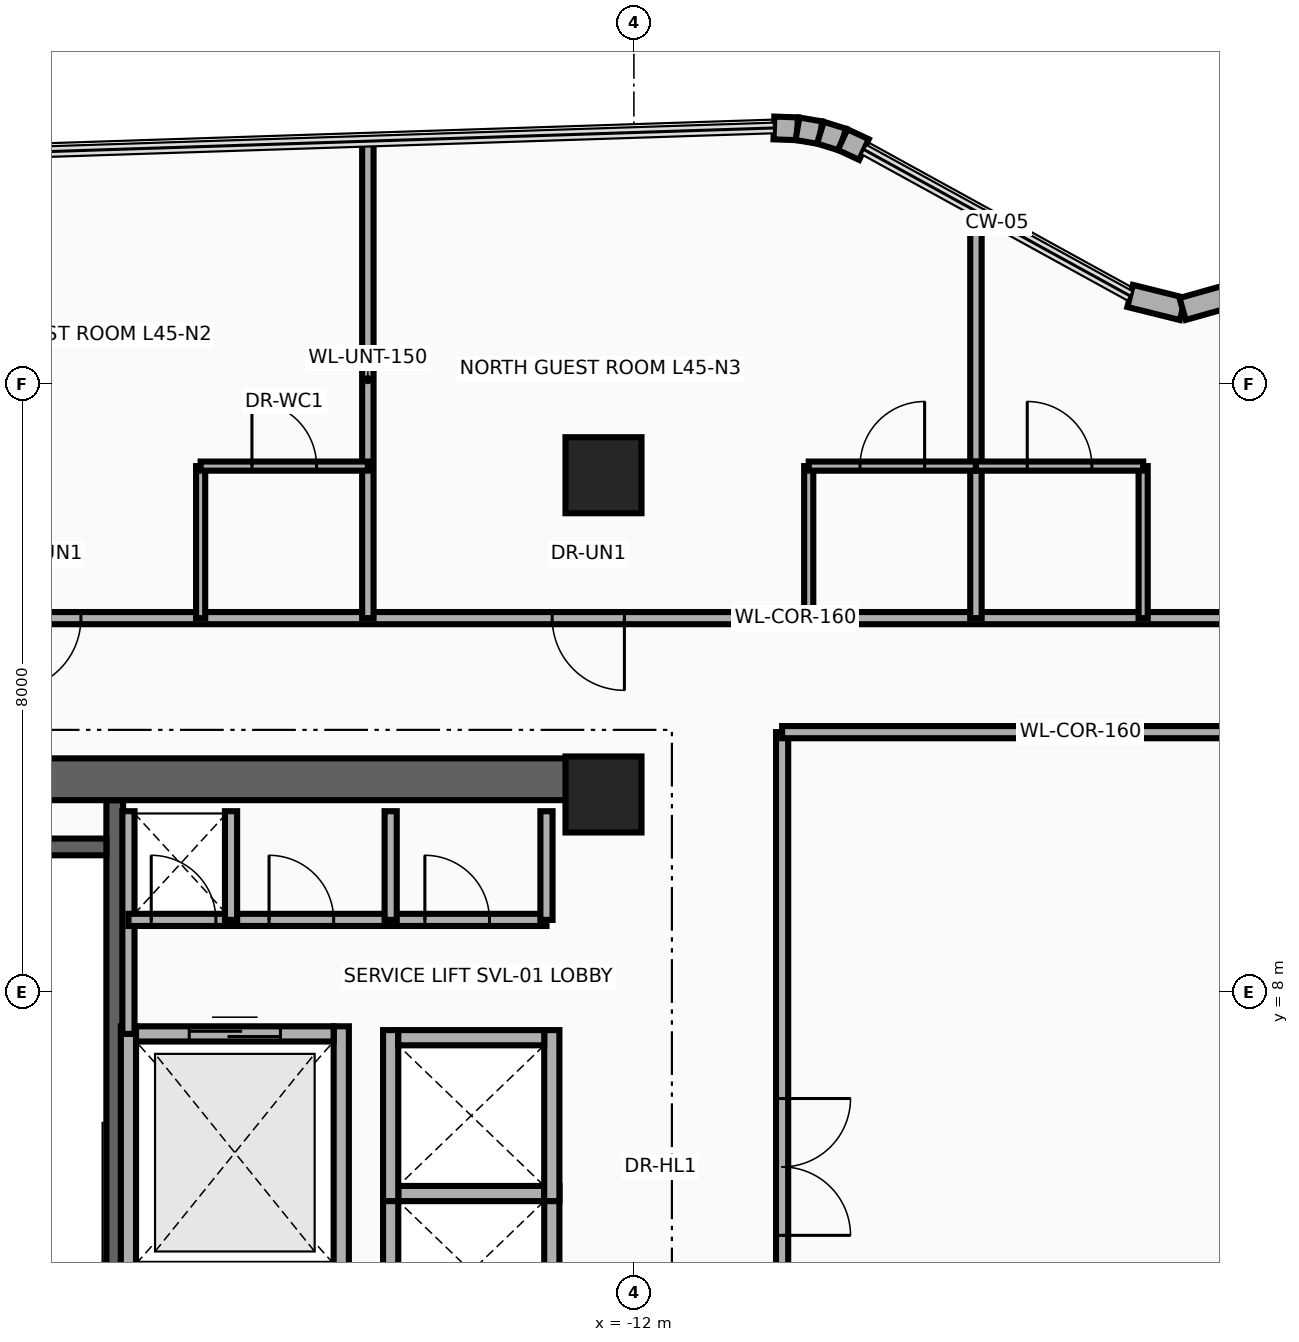
"""IFC4 building model, lengths in metres.
Left out: names, types, materials, properties, quantities, classifications, styles, units other than length and angle.
Written with IfcOpenShell. Run it as: python <this file> out.ifc"""

import sys

from ifc_helpers import new_model, si_unit, direction, frame, frame_2d, origin, origin_2d, place, context, subcontext, project, spatial, rectangle, extrude, source, transform, mapped, element, fill, save


model = new_model("IFC4")
c1 = context("Model", 3, precision=1e-05, world=origin(), true_north=direction((0.0, 1.0)))
c2 = subcontext(c1, "Body", "Model", "MODEL_VIEW")
j1 = project(units=[si_unit("LENGTHUNIT", "METRE"), si_unit("PLANEANGLEUNIT", "RADIAN")], contexts=[c1])
p1 = place(None, origin())
s1 = spatial("IfcSite", under=j1, at=p1, CompositionType="ELEMENT")
p2 = place(p1, origin())
s2 = spatial("IfcBuilding", under=s1, at=p2, CompositionType="ELEMENT")
p3 = place(p2, frame((0.0, 0.0, 176.55)))
s3 = spatial("IfcBuildingStorey", under=s2, at=p3, CompositionType="ELEMENT", Elevation=176.55)
p4 = place(p3, frame((-18.83, 1.78, 0.0), z_axis=(0.0, 0.0, 1.0), x_axis=(0.0, 1.0, 0.0)))
e1 = element("IfcWall", 1, at=p4, inside=s3, PredefinedType="SHEAR", context=c2, shape_type="SweptSolid", body=[
    extrude(rectangle(XDim=8.745, YDim=0.22, at=frame_2d((4.373, 0.0))), origin(), (0.0, 0.0, 1.0), 3.63),
])
p5 = place(p3, frame((-22.05, 9.91, 0.0), z_axis=(0.0, 0.0, 1.0), x_axis=(1.0, 0.0, 0.0)))
e2 = element("IfcWall", 2, at=p5, inside=s3, PredefinedType="SHEAR", context=c2, shape_type="SweptSolid", body=[
    extrude(rectangle(XDim=3.11, YDim=0.22, at=frame_2d((1.555, 0.0))), origin(), (0.0, 0.0, 1.0), 3.63),
])
p6 = place(p3, frame((-22.65, 10.8, 0.0), z_axis=(0.0, 0.0, 1.0), x_axis=(1.0, 0.0, 0.0)))
e3 = element("IfcWall", 3, at=p6, inside=s3, PredefinedType="SHEAR", context=c2, shape_type="SweptSolid", body=[
    extrude(rectangle(XDim=10.25, YDim=0.55, at=frame_2d((5.125, 0.0))), origin(), (0.0, 0.0, 1.0), 3.63),
])
m1 = source(origin(), c2, "Body", "SweptSolid", [
    extrude(rectangle(XDim=1.0, YDim=1.0, at=origin_2d()), origin(), (0.0, 0.0, 1.0), 3.95),
])
for number, where, z_axis, x_axis in (
    (4, (-12.4, 10.6, 0.0), (0.0, 0.0, 1.0), (1.0, 0.0, 0.0)),
    (5, (-12.4, 14.8, 0.0), (0.0, 0.0, 1.0), (1.0, 0.0, 0.0)),
):
    element("IfcColumn", number, at=place(p3, frame(where, z_axis=z_axis, x_axis=x_axis)), inside=s3, PredefinedType="COLUMN", context=c2, shape_type="MappedRepresentation", body=[
        mapped(m1, transform((0.0, 0.0, 0.0), x_axis=(1.0, 0.0, 0.0), y_axis=(0.0, 1.0, 0.0), z_axis=(0.0, 0.0, 1.0), scale=1.0)),
    ])
p7 = place(p3, frame((-10.158, 19.368, 0.0), z_axis=(0.0, 0.0, 1.0), x_axis=(0.999425494718, -0.03389218949, 0.0)))
e6 = element("IfcWall", 6, at=p7, inside=s3, PredefinedType="SOLIDWALL", context=c2, shape_type="SweptSolid", body=[
    extrude(rectangle(XDim=0.31, YDim=0.3, at=frame_2d((0.155, 0.0))), origin(), (0.0, 0.0, 1.0), 3.63),
])
for number, where, z_axis, x_axis in (
    (7, (-9.848, 19.358, 0.0), (0.0, 0.0, 1.0), (0.986, -0.167, 0.0)),
    (8, (-9.546, 19.307, 0.0), (0.0, 0.0, 1.0), (0.955, -0.297, 0.0)),
):
    element("IfcWall", number, at=place(p3, frame(where, z_axis=z_axis, x_axis=x_axis)), inside=s3, PredefinedType="SOLIDWALL", context=c2, shape_type="SweptSolid", body=[
        extrude(rectangle(XDim=0.306, YDim=0.3, at=frame_2d((0.153, 0.0))), origin(), (0.0, 0.0, 1.0), 3.63),
    ])
p8 = place(p3, frame((-9.254, 19.216, 0.0), z_axis=(0.0, 0.0, 1.0), x_axis=(0.906524902388, -0.42215234377, 0.0)))
e9 = element("IfcWall", 9, at=p8, inside=s3, PredefinedType="SOLIDWALL", context=c2, shape_type="SweptSolid", body=[
    extrude(rectangle(XDim=0.31, YDim=0.3, at=frame_2d((0.155, 0.0))), origin(), (0.0, 0.0, 1.0), 3.63),
])
p9 = place(p3, frame((-5.472, 17.159, 0.0), z_axis=(0.0, 0.0, 1.0), x_axis=(0.970564820059, -0.240840050789, 0.0)))
e10 = element("IfcWall", 10, at=p9, inside=s3, PredefinedType="SOLIDWALL", context=c2, shape_type="SweptSolid", body=[
    extrude(rectangle(XDim=0.712, YDim=0.3, at=frame_2d((0.356, 0.0))), origin(), (0.0, 0.0, 1.0), 3.63),
])
p10 = place(p3, frame((-4.781, 16.987, 0.0), z_axis=(0.0, 0.0, 1.0), x_axis=(0.962494705656, 0.271300463662, 0.0)))
e11 = element("IfcWall", 11, at=p10, inside=s3, PredefinedType="SOLIDWALL", context=c2, shape_type="SweptSolid", body=[
    extrude(rectangle(XDim=0.726, YDim=0.3, at=frame_2d((0.363, 0.0))), origin(), (0.0, 0.0, 1.0), 3.63),
])
for number, where, z_axis, x_axis in (
    (12, (-18.65, 4.225, 0.0), (0.0, 0.0, 1.0), (0.0, 1.0, 0.0)),
    (13, (-15.85, 4.225, 0.0), (0.0, 0.0, 1.0), (0.0, 1.0, 0.0)),
):
    element("IfcWall", number, at=place(p3, frame(where, z_axis=z_axis, x_axis=x_axis)), inside=s3, PredefinedType="MOVABLE", context=c2, shape_type="SweptSolid", body=[
        extrude(rectangle(XDim=3.325, YDim=0.2, at=frame_2d((1.663, 0.0))), origin(), (0.0, 0.0, 1.0), 3.63),
    ])
p11 = place(p3, frame((-18.55, 7.45, 0.0), z_axis=(0.0, 0.0, 1.0), x_axis=(1.0, 0.0, 0.0)))
e14 = element("IfcWall", 14, at=p11, inside=s3, PredefinedType="MOVABLE", context=c2, shape_type="SweptSolid", body=[
    extrude(rectangle(XDim=2.6, YDim=0.2, at=frame_2d((1.3, 0.0))), origin(), (0.0, 0.0, 1.0), 3.63),
])
p12 = place(p11, frame((0.7, 0.0, 0.0)))
e15 = element("IfcOpeningElement", 15, at=p12, cuts=e14, PredefinedType="OPENING", context=c2, shape_type="SweptSolid", body=[
    extrude(rectangle(XDim=1.2, YDim=2.1, at=frame_2d((0.6, 1.05))), frame((0.0, 0.115, 0.0), z_axis=(0.0, -1.0, 0.0), x_axis=(1.0, 0.0, 0.0)), (0.0, 0.0, 1.0), 0.23),
])
for number, where, z_axis, x_axis in (
    (16, (-15.2, 3.2, 0.0), (0.0, 0.0, 1.0), (0.0, 1.0, 0.0)),
    (17, (-13.08, 3.2, 0.0), (0.0, 0.0, 1.0), (0.0, 1.0, 0.0)),
):
    element("IfcWall", number, at=place(p3, frame(where, z_axis=z_axis, x_axis=x_axis)), inside=s3, PredefinedType="MOVABLE", context=c2, shape_type="SweptSolid", body=[
        extrude(rectangle(XDim=2.25, YDim=0.2, at=frame_2d((1.125, 0.0))), origin(), (0.0, 0.0, 1.0), 3.63),
    ])
p13 = place(p3, frame((-15.1, 5.35, 0.0), z_axis=(0.0, 0.0, 1.0), x_axis=(1.0, 0.0, 0.0)))
e18 = element("IfcWall", 18, at=p13, inside=s3, PredefinedType="MOVABLE", context=c2, shape_type="SweptSolid", body=[
    extrude(rectangle(XDim=1.92, YDim=0.2, at=frame_2d((0.96, 0.0))), origin(), (0.0, 0.0, 1.0), 3.63),
])
for number, where, z_axis, x_axis in (
    (19, (-15.2, 5.25, 0.0), (0.0, 0.0, 1.0), (0.0, 1.0, 0.0)),
    (20, (-13.08, 5.25, 0.0), (0.0, 0.0, 1.0), (0.0, 1.0, 0.0)),
):
    element("IfcWall", number, at=place(p3, frame(where, z_axis=z_axis, x_axis=x_axis)), inside=s3, PredefinedType="MOVABLE", context=c2, shape_type="SweptSolid", body=[
        extrude(rectangle(XDim=2.25, YDim=0.2, at=frame_2d((1.125, 0.0))), origin(), (0.0, 0.0, 1.0), 3.63),
    ])
p14 = place(p3, frame((-15.1, 7.4, 0.0), z_axis=(0.0, 0.0, 1.0), x_axis=(1.0, 0.0, 0.0)))
e21 = element("IfcWall", 21, at=p14, inside=s3, PredefinedType="MOVABLE", context=c2, shape_type="SweptSolid", body=[
    extrude(rectangle(XDim=1.92, YDim=0.2, at=frame_2d((0.96, 0.0))), origin(), (0.0, 0.0, 1.0), 3.63),
])
p15 = place(p3, frame((-18.65, 7.45, 0.0), z_axis=(0.0, 0.0, 1.0), x_axis=(0.0, 1.0, 0.0)))
e22 = element("IfcWall", 22, at=p15, inside=s3, PredefinedType="PARTITIONING", context=c2, shape_type="SweptSolid", body=[
    extrude(rectangle(XDim=2.93, YDim=0.16, at=frame_2d((1.465, 0.0))), origin(), (0.0, 0.0, 1.0), 3.63),
])
p16 = place(p3, frame((-18.65, 8.95, 0.0), z_axis=(0.0, 0.0, 1.0), x_axis=(1.0, 0.0, 0.0)))
e23 = element("IfcWall", 23, at=p16, inside=s3, PredefinedType="PARTITIONING", context=c2, shape_type="SweptSolid", body=[
    extrude(rectangle(XDim=5.5, YDim=0.16, at=frame_2d((2.75, 0.0))), origin(), (0.0, 0.0, 1.0), 3.63),
])
p17 = place(p16, frame((0.3, 0.0, 0.0)))
e24 = element("IfcOpeningElement", 24, at=p17, cuts=e23, PredefinedType="OPENING", context=c2, shape_type="SweptSolid", body=[
    extrude(rectangle(XDim=0.85, YDim=2.05, at=frame_2d((0.425, 1.025))), frame((0.0, 0.095, 0.0), z_axis=(0.0, -1.0, 0.0), x_axis=(1.0, 0.0, 0.0)), (0.0, 0.0, 1.0), 0.19),
])
p18 = place(p16, frame((1.85, 0.0, 0.0)))
e25 = element("IfcOpeningElement", 25, at=p18, cuts=e23, PredefinedType="OPENING", context=c2, shape_type="SweptSolid", body=[
    extrude(rectangle(XDim=0.85, YDim=2.05, at=frame_2d((0.425, 1.025))), frame((0.0, 0.095, 0.0), z_axis=(0.0, -1.0, 0.0), x_axis=(1.0, 0.0, 0.0)), (0.0, 0.0, 1.0), 0.19),
])
p19 = place(p16, frame((3.9, 0.0, 0.0)))
e26 = element("IfcOpeningElement", 26, at=p19, cuts=e23, PredefinedType="OPENING", context=c2, shape_type="SweptSolid", body=[
    extrude(rectangle(XDim=0.85, YDim=2.05, at=frame_2d((0.425, 1.025))), frame((0.0, 0.095, 0.0), z_axis=(0.0, -1.0, 0.0), x_axis=(1.0, 0.0, 0.0)), (0.0, 0.0, 1.0), 0.19),
])
for number, where, z_axis, x_axis in (
    (27, (-13.15, 8.95, 0.0), (0.0, 0.0, 1.0), (0.0, 1.0, 0.0)),
    (28, (-17.3, 8.95, 0.0), (0.0, 0.0, 1.0), (0.0, 1.0, 0.0)),
    (29, (-15.2, 8.95, 0.0), (0.0, 0.0, 1.0), (0.0, 1.0, 0.0)),
):
    element("IfcWall", number, at=place(p3, frame(where, z_axis=z_axis, x_axis=x_axis)), inside=s3, PredefinedType="PARTITIONING", context=c2, shape_type="SweptSolid", body=[
        extrude(rectangle(XDim=1.43, YDim=0.16, at=frame_2d((0.715, 0.0))), origin(), (0.0, 0.0, 1.0), 3.63),
    ])
p20 = place(p3, frame((-28.25, 12.92, 0.0), z_axis=(0.0, 0.0, 1.0), x_axis=(1.0, 0.0, 0.0)))
e30 = element("IfcWall", 30, at=p20, inside=s3, PredefinedType="PARTITIONING", context=c2, shape_type="SweptSolid", body=[
    extrude(rectangle(XDim=36.75, YDim=0.16, at=frame_2d((18.375, 0.0))), origin(), (0.0, 0.0, 1.0), 2.615),
])
p21 = place(p20, frame((2.75, 0.0, 0.0)))
e31 = element("IfcOpeningElement", 31, at=p21, cuts=e30, PredefinedType="OPENING", context=c2, shape_type="SweptSolid", body=[
    extrude(rectangle(XDim=0.95, YDim=2.15, at=frame_2d((0.475, 1.075))), frame((0.0, 0.095, 0.0), z_axis=(0.0, -1.0, 0.0), x_axis=(1.0, 0.0, 0.0)), (0.0, 0.0, 1.0), 0.19),
])
p22 = place(p20, frame((8.025, 0.0, 0.0)))
e32 = element("IfcOpeningElement", 32, at=p22, cuts=e30, PredefinedType="OPENING", context=c2, shape_type="SweptSolid", body=[
    extrude(rectangle(XDim=0.95, YDim=2.15, at=frame_2d((0.475, 1.075))), frame((0.0, 0.095, 0.0), z_axis=(0.0, -1.0, 0.0), x_axis=(1.0, 0.0, 0.0)), (0.0, 0.0, 1.0), 0.19),
])
p23 = place(p20, frame((15.175, 0.0, 0.0)))
e33 = element("IfcOpeningElement", 33, at=p23, cuts=e30, PredefinedType="OPENING", context=c2, shape_type="SweptSolid", body=[
    extrude(rectangle(XDim=0.95, YDim=2.15, at=frame_2d((0.475, 1.075))), frame((0.0, 0.095, 0.0), z_axis=(0.0, -1.0, 0.0), x_axis=(1.0, 0.0, 0.0)), (0.0, 0.0, 1.0), 0.19),
])
p24 = place(p20, frame((25.375, 0.0, 0.0)))
e34 = element("IfcOpeningElement", 34, at=p24, cuts=e30, PredefinedType="OPENING", context=c2, shape_type="SweptSolid", body=[
    extrude(rectangle(XDim=0.95, YDim=2.15, at=frame_2d((0.475, 1.075))), frame((0.0, 0.095, 0.0), z_axis=(0.0, -1.0, 0.0), x_axis=(1.0, 0.0, 0.0)), (0.0, 0.0, 1.0), 0.19),
])
p25 = place(p20, frame((32.275, 0.0, 0.0)))
e35 = element("IfcOpeningElement", 35, at=p25, cuts=e30, PredefinedType="OPENING", context=c2, shape_type="SweptSolid", body=[
    extrude(rectangle(XDim=0.95, YDim=2.15, at=frame_2d((0.475, 1.075))), frame((0.0, 0.095, 0.0), z_axis=(0.0, -1.0, 0.0), x_axis=(1.0, 0.0, 0.0)), (0.0, 0.0, 1.0), 0.19),
])
p26 = place(p3, frame((-15.5, 12.92, 0.0), z_axis=(0.0, 0.0, 1.0), x_axis=(0.0, 1.0, 0.0)))
e36 = element("IfcWall", 36, at=p26, inside=s3, PredefinedType="PARTITIONING", context=c2, shape_type="SweptSolid", body=[
    extrude(rectangle(XDim=6.275, YDim=0.15, at=frame_2d((3.137, 0.0))), origin(), (0.0, 0.0, 1.0), 2.665),
])
p27 = place(p3, frame((-7.5, 12.92, 0.0), z_axis=(0.0, 0.0, 1.0), x_axis=(0.0, 1.0, 0.0)))
e37 = element("IfcWall", 37, at=p27, inside=s3, PredefinedType="PARTITIONING", context=c2, shape_type="SweptSolid", body=[
    extrude(rectangle(XDim=5.354, YDim=0.15, at=frame_2d((2.677, 0.0))), origin(), (0.0, 0.0, 1.0), 2.415),
])
p28 = place(p3, frame((-17.7, 12.92, 0.0), z_axis=(0.0, 0.0, 1.0), x_axis=(0.0, 1.0, 0.0)))
e38 = element("IfcWall", 38, at=p28, inside=s3, PredefinedType="PARTITIONING", context=c2, shape_type="SweptSolid", body=[
    extrude(rectangle(XDim=2.0, YDim=0.12, at=frame_2d((1.0, 0.0))), origin(), (0.0, 0.0, 1.0), 2.665),
])
p29 = place(p3, frame((-17.7, 14.92, 0.0), z_axis=(0.0, 0.0, 1.0), x_axis=(1.0, 0.0, 0.0)))
e39 = element("IfcWall", 39, at=p29, inside=s3, PredefinedType="PARTITIONING", context=c2, shape_type="SweptSolid", body=[
    extrude(rectangle(XDim=2.2, YDim=0.12, at=frame_2d((1.1, 0.0))), origin(), (0.0, 0.0, 1.0), 2.665),
])
p30 = place(p29, frame((0.675, 0.0, 0.0)))
e40 = element("IfcOpeningElement", 40, at=p30, cuts=e39, PredefinedType="OPENING", context=c2, shape_type="SweptSolid", body=[
    extrude(rectangle(XDim=0.85, YDim=2.1, at=frame_2d((0.425, 1.05))), frame((0.0, 0.075, 0.0), z_axis=(0.0, -1.0, 0.0), x_axis=(1.0, 0.0, 0.0)), (0.0, 0.0, 1.0), 0.15),
])
p31 = place(p3, frame((-9.7, 12.92, 0.0), z_axis=(0.0, 0.0, 1.0), x_axis=(0.0, 1.0, 0.0)))
e41 = element("IfcWall", 41, at=p31, inside=s3, PredefinedType="PARTITIONING", context=c2, shape_type="SweptSolid", body=[
    extrude(rectangle(XDim=2.0, YDim=0.12, at=frame_2d((1.0, 0.0))), origin(), (0.0, 0.0, 1.0), 2.415),
])
p32 = place(p3, frame((-9.7, 14.92, 0.0), z_axis=(0.0, 0.0, 1.0), x_axis=(1.0, 0.0, 0.0)))
e42 = element("IfcWall", 42, at=p32, inside=s3, PredefinedType="PARTITIONING", context=c2, shape_type="SweptSolid", body=[
    extrude(rectangle(XDim=2.2, YDim=0.12, at=frame_2d((1.1, 0.0))), origin(), (0.0, 0.0, 1.0), 2.415),
])
p33 = place(p32, frame((0.675, 0.0, 0.0)))
e43 = element("IfcOpeningElement", 43, at=p33, cuts=e42, PredefinedType="OPENING", context=c2, shape_type="SweptSolid", body=[
    extrude(rectangle(XDim=0.85, YDim=2.1, at=frame_2d((0.425, 1.05))), frame((0.0, 0.075, 0.0), z_axis=(0.0, -1.0, 0.0), x_axis=(1.0, 0.0, 0.0)), (0.0, 0.0, 1.0), 0.15),
])
p34 = place(p3, frame((-5.3, 12.92, 0.0), z_axis=(0.0, 0.0, 1.0), x_axis=(0.0, 1.0, 0.0)))
e44 = element("IfcWall", 44, at=p34, inside=s3, PredefinedType="PARTITIONING", context=c2, shape_type="SweptSolid", body=[
    extrude(rectangle(XDim=2.0, YDim=0.12, at=frame_2d((1.0, 0.0))), origin(), (0.0, 0.0, 1.0), 2.415),
])
p35 = place(p3, frame((-7.5, 14.92, 0.0), z_axis=(0.0, 0.0, 1.0), x_axis=(1.0, 0.0, 0.0)))
e45 = element("IfcWall", 45, at=p35, inside=s3, PredefinedType="PARTITIONING", context=c2, shape_type="SweptSolid", body=[
    extrude(rectangle(XDim=2.2, YDim=0.12, at=frame_2d((1.1, 0.0))), origin(), (0.0, 0.0, 1.0), 2.415),
])
p36 = place(p35, frame((0.675, 0.0, 0.0)))
e46 = element("IfcOpeningElement", 46, at=p36, cuts=e45, PredefinedType="OPENING", context=c2, shape_type="SweptSolid", body=[
    extrude(rectangle(XDim=0.85, YDim=2.1, at=frame_2d((0.425, 1.05))), frame((0.0, 0.075, 0.0), z_axis=(0.0, -1.0, 0.0), x_axis=(1.0, 0.0, 0.0)), (0.0, 0.0, 1.0), 0.15),
])
p37 = place(p3, frame((-10.05, -7.2, 0.0), z_axis=(0.0, 0.0, 1.0), x_axis=(0.0, 1.0, 0.0)))
e47 = element("IfcWall", 47, at=p37, inside=s3, PredefinedType="PARTITIONING", context=c2, shape_type="SweptSolid", body=[
    extrude(rectangle(XDim=18.62, YDim=0.16, at=frame_2d((9.31, 0.0))), origin(), (0.0, 0.0, 1.0), 2.415),
])
p38 = place(p37, frame((12.0, 0.0, 0.0)))
e48 = element("IfcOpeningElement", 48, at=p38, cuts=e47, PredefinedType="OPENING", context=c2, shape_type="SweptSolid", body=[
    extrude(rectangle(XDim=1.8, YDim=2.15, at=frame_2d((0.9, 1.075))), frame((0.0, 0.095, 0.0), z_axis=(0.0, -1.0, 0.0), x_axis=(1.0, 0.0, 0.0)), (0.0, 0.0, 1.0), 0.19),
])
p39 = place(p3, frame((-10.05, 11.42, 0.0), z_axis=(0.0, 0.0, 1.0), x_axis=(1.0, 0.0, 0.0)))
e49 = element("IfcWall", 49, at=p39, inside=s3, PredefinedType="PARTITIONING", context=c2, shape_type="SweptSolid", body=[
    extrude(rectangle(XDim=7.85, YDim=0.16, at=frame_2d((3.925, 0.0))), origin(), (0.0, 0.0, 1.0), 2.615),
])
p40 = place(p12, origin())
e50 = element("IfcDoor", 50, at=p40, inside=s3, OperationType="DOUBLE_DOOR_SLIDING", PredefinedType="DOOR", context=c2, shape_type="SweptSolid", body=[
    extrude(rectangle(XDim=1.2, YDim=2.1, at=frame_2d((0.6, 1.05))), frame((0.0, 0.025, 0.0), z_axis=(0.0, -1.0, 0.0), x_axis=(1.0, 0.0, 0.0)), (0.0, 0.0, 1.0), 0.05),
])
fill(e15, e50)
p41 = place(p17, origin())
e51 = element("IfcDoor", 51, at=p41, inside=s3, OperationType="SINGLE_SWING_LEFT", PredefinedType="DOOR", context=c2, shape_type="SweptSolid", body=[
    extrude(rectangle(XDim=0.85, YDim=2.05, at=frame_2d((0.425, 1.025))), frame((0.0, 0.025, 0.0), z_axis=(0.0, -1.0, 0.0), x_axis=(1.0, 0.0, 0.0)), (0.0, 0.0, 1.0), 0.05),
])
fill(e24, e51)
p42 = place(p18, origin())
e52 = element("IfcDoor", 52, at=p42, inside=s3, OperationType="SINGLE_SWING_RIGHT", PredefinedType="DOOR", context=c2, shape_type="SweptSolid", body=[
    extrude(rectangle(XDim=0.85, YDim=2.05, at=frame_2d((0.425, 1.025))), frame((0.0, 0.025, 0.0), z_axis=(0.0, -1.0, 0.0), x_axis=(1.0, 0.0, 0.0)), (0.0, 0.0, 1.0), 0.05),
])
fill(e25, e52)
p43 = place(p19, origin())
e53 = element("IfcDoor", 53, at=p43, inside=s3, OperationType="SINGLE_SWING_LEFT", PredefinedType="DOOR", context=c2, shape_type="SweptSolid", body=[
    extrude(rectangle(XDim=0.85, YDim=2.05, at=frame_2d((0.425, 1.025))), frame((0.0, 0.025, 0.0), z_axis=(0.0, -1.0, 0.0), x_axis=(1.0, 0.0, 0.0)), (0.0, 0.0, 1.0), 0.05),
])
fill(e26, e53)
p44 = place(p22, frame((0.95, 0.0, 0.0), z_axis=(0.0, 0.0, 1.0), x_axis=(-1.0, 0.0, 0.0)))
e54 = element("IfcDoor", 54, at=p44, inside=s3, OperationType="SINGLE_SWING_LEFT", PredefinedType="DOOR", context=c2, shape_type="SweptSolid", body=[
    extrude(rectangle(XDim=0.95, YDim=2.15, at=frame_2d((0.475, 1.075))), frame((0.0, 0.025, 0.0), z_axis=(0.0, -1.0, 0.0), x_axis=(1.0, 0.0, 0.0)), (0.0, 0.0, 1.0), 0.05),
])
fill(e32, e54)
p45 = place(p30, origin())
e55 = element("IfcDoor", 55, at=p45, inside=s3, OperationType="SINGLE_SWING_RIGHT", PredefinedType="DOOR", context=c2, shape_type="SweptSolid", body=[
    extrude(rectangle(XDim=0.85, YDim=2.1, at=frame_2d((0.425, 1.05))), frame((0.0, 0.025, 0.0), z_axis=(0.0, -1.0, 0.0), x_axis=(1.0, 0.0, 0.0)), (0.0, 0.0, 1.0), 0.05),
])
fill(e40, e55)
p46 = place(p23, frame((0.95, 0.0, 0.0), z_axis=(0.0, 0.0, 1.0), x_axis=(-1.0, 0.0, 0.0)))
e56 = element("IfcDoor", 56, at=p46, inside=s3, OperationType="SINGLE_SWING_LEFT", PredefinedType="DOOR", context=c2, shape_type="SweptSolid", body=[
    extrude(rectangle(XDim=0.95, YDim=2.15, at=frame_2d((0.475, 1.075))), frame((0.0, 0.025, 0.0), z_axis=(0.0, -1.0, 0.0), x_axis=(1.0, 0.0, 0.0)), (0.0, 0.0, 1.0), 0.05),
])
fill(e33, e56)
p47 = place(p33, origin())
e57 = element("IfcDoor", 57, at=p47, inside=s3, OperationType="SINGLE_SWING_RIGHT", PredefinedType="DOOR", context=c2, shape_type="SweptSolid", body=[
    extrude(rectangle(XDim=0.85, YDim=2.1, at=frame_2d((0.425, 1.05))), frame((0.0, 0.025, 0.0), z_axis=(0.0, -1.0, 0.0), x_axis=(1.0, 0.0, 0.0)), (0.0, 0.0, 1.0), 0.05),
])
fill(e43, e57)
p48 = place(p36, origin())
e58 = element("IfcDoor", 58, at=p48, inside=s3, OperationType="SINGLE_SWING_RIGHT", PredefinedType="DOOR", context=c2, shape_type="SweptSolid", body=[
    extrude(rectangle(XDim=0.85, YDim=2.1, at=frame_2d((0.425, 1.05))), frame((0.0, 0.025, 0.0), z_axis=(0.0, -1.0, 0.0), x_axis=(1.0, 0.0, 0.0)), (0.0, 0.0, 1.0), 0.05),
])
fill(e46, e58)
p49 = place(p38, frame((1.8, 0.0, 0.0), z_axis=(0.0, 0.0, 1.0), x_axis=(-1.0, 0.0, 0.0)))
e59 = element("IfcDoor", 59, at=p49, inside=s3, OperationType="DOUBLE_DOOR_SINGLE_SWING", PredefinedType="DOOR", context=c2, shape_type="SweptSolid", body=[
    extrude(rectangle(XDim=1.8, YDim=2.15, at=frame_2d((0.9, 1.075))), frame((0.0, 0.025, 0.0), z_axis=(0.0, -1.0, 0.0), x_axis=(1.0, 0.0, 0.0)), (0.0, 0.0, 1.0), 0.05),
])
fill(e48, e59)
save(model, sys.argv[1])
